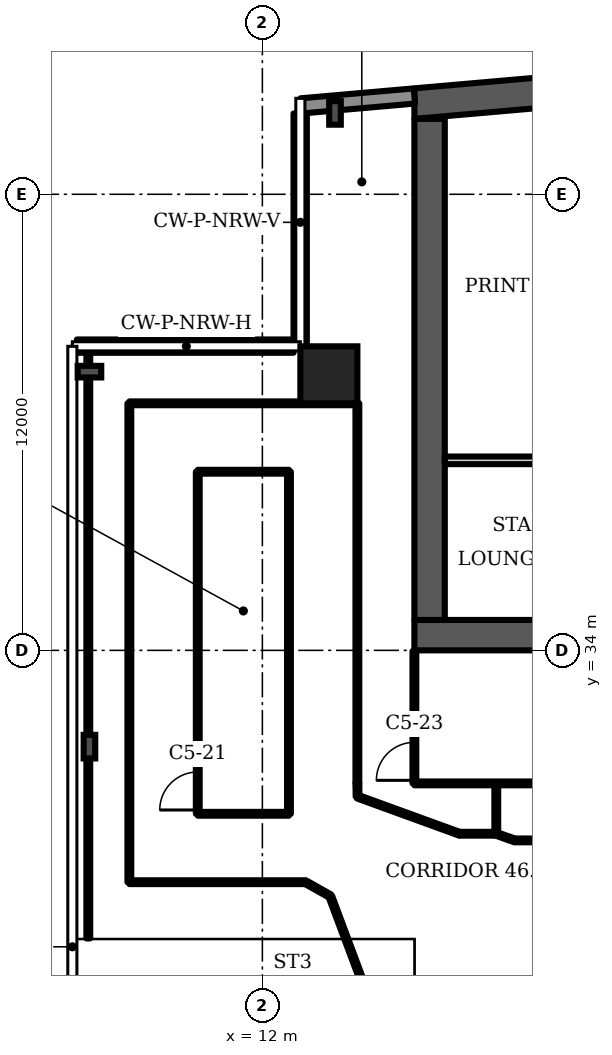
"""IFC4 building model, lengths in metres.
Left out: names, types, materials, properties, quantities, classifications, styles, units other than length and angle.
Written with IfcOpenShell. Run it as: python <this file> out.ifc"""

import sys

from ifc_helpers import new_model, si_unit, direction, frame, frame_2d, origin, origin_2d, place, context, subcontext, project, spatial, polyline, rectangle, i_section, outline, extrude, element, fill, save


model = new_model("IFC4")
c1 = context("Model", 3, precision=1e-05, world=origin(), true_north=direction((0.0, 1.0)))
c2 = subcontext(c1, "Body", "Model", "MODEL_VIEW")
j1 = project(units=[si_unit("LENGTHUNIT", "METRE"), si_unit("PLANEANGLEUNIT", "RADIAN")], contexts=[c1])
p1 = place(None, origin())
s1 = spatial("IfcSite", under=j1, at=p1, CompositionType="ELEMENT")
p2 = place(p1, origin())
s2 = spatial("IfcBuilding", under=s1, at=p2, CompositionType="ELEMENT")
p3 = place(p2, frame((0.0, 0.0, 187.9)))
s3 = spatial("IfcBuildingStorey", under=s2, at=p3, CompositionType="ELEMENT", Elevation=187.9)
p4 = place(p3, origin())
e1 = element("IfcWall", 1, at=p4, inside=s3, PredefinedType="SHEAR", context=c2, shape_type="SweptSolid", body=[
    extrude(outline(polyline([(16.0, 47.984), (37.0, 49.822), (58.0, 47.984), (58.0, 48.787), (37.0, 50.625), (16.0, 48.787), (16.0, 47.984)])), origin(), (0.0, 0.0, 1.0), 3.6),
])
p5 = place(p3, frame((16.0, 34.4, 0.0), z_axis=(0.0, 0.0, 1.0), x_axis=(1.0, 0.0, 0.0)))
e2 = element("IfcWall", 2, at=p5, inside=s3, PredefinedType="SHEAR", context=c2, shape_type="SweptSolid", body=[
    extrude(rectangle(XDim=42.0, YDim=0.8, at=frame_2d((21.0, 0.0))), origin(), (0.0, 0.0, 1.0), 3.6),
])
p6 = place(p5, frame((3.2, 0.0, 0.0)))
e3 = element("IfcOpeningElement", 3, at=p6, cuts=e2, PredefinedType="OPENING", context=c2, shape_type="SweptSolid", body=[
    extrude(rectangle(XDim=1.0, YDim=2.1, at=frame_2d((0.5, 1.05))), frame((0.0, 0.41, 0.0), z_axis=(0.0, -1.0, 0.0), x_axis=(1.0, 0.0, 0.0)), (0.0, 0.0, 1.0), 0.82),
])
p7 = place(p5, frame((7.65, 0.0, 0.0)))
e4 = element("IfcOpeningElement", 4, at=p7, cuts=e2, PredefinedType="OPENING", context=c2, shape_type="SweptSolid", body=[
    extrude(rectangle(XDim=1.2, YDim=2.1, at=frame_2d((0.6, 1.05))), frame((0.0, 0.41, 0.0), z_axis=(0.0, -1.0, 0.0), x_axis=(1.0, 0.0, 0.0)), (0.0, 0.0, 1.0), 0.82),
])
p8 = place(p5, frame((14.767, 0.0, 0.0)))
e5 = element("IfcOpeningElement", 5, at=p8, cuts=e2, PredefinedType="OPENING", context=c2, shape_type="SweptSolid", body=[
    extrude(rectangle(XDim=1.1, YDim=2.1, at=frame_2d((0.55, 1.05))), frame((0.0, 0.41, 0.0), z_axis=(0.0, -1.0, 0.0), x_axis=(1.0, 0.0, 0.0)), (0.0, 0.0, 1.0), 0.82),
])
p9 = place(p5, frame((19.133, 0.0, 0.0)))
e6 = element("IfcOpeningElement", 6, at=p9, cuts=e2, PredefinedType="OPENING", context=c2, shape_type="SweptSolid", body=[
    extrude(rectangle(XDim=1.1, YDim=2.1, at=frame_2d((0.55, 1.05))), frame((0.0, 0.41, 0.0), z_axis=(0.0, -1.0, 0.0), x_axis=(1.0, 0.0, 0.0)), (0.0, 0.0, 1.0), 0.82),
])
p10 = place(p5, frame((16.8, 0.0, 0.0)))
e7 = element("IfcOpeningElement", 7, at=p10, cuts=e2, PredefinedType="OPENING", context=c2, shape_type="SweptSolid", body=[
    extrude(rectangle(XDim=1.4, YDim=2.1, at=frame_2d((0.7, 1.05))), frame((0.0, 0.41, 0.0), z_axis=(0.0, -1.0, 0.0), x_axis=(1.0, 0.0, 0.0)), (0.0, 0.0, 1.0), 0.82),
])
p11 = place(p5, frame((21.767, 0.0, 0.0)))
e8 = element("IfcOpeningElement", 8, at=p11, cuts=e2, PredefinedType="OPENING", context=c2, shape_type="SweptSolid", body=[
    extrude(rectangle(XDim=1.1, YDim=2.1, at=frame_2d((0.55, 1.05))), frame((0.0, 0.41, 0.0), z_axis=(0.0, -1.0, 0.0), x_axis=(1.0, 0.0, 0.0)), (0.0, 0.0, 1.0), 0.82),
])
p12 = place(p5, frame((23.95, 0.0, 0.0)))
e9 = element("IfcOpeningElement", 9, at=p12, cuts=e2, PredefinedType="OPENING", context=c2, shape_type="SweptSolid", body=[
    extrude(rectangle(XDim=1.1, YDim=2.1, at=frame_2d((0.55, 1.05))), frame((0.0, 0.41, 0.0), z_axis=(0.0, -1.0, 0.0), x_axis=(1.0, 0.0, 0.0)), (0.0, 0.0, 1.0), 0.82),
])
p13 = place(p5, frame((26.133, 0.0, 0.0)))
e10 = element("IfcOpeningElement", 10, at=p13, cuts=e2, PredefinedType="OPENING", context=c2, shape_type="SweptSolid", body=[
    extrude(rectangle(XDim=1.1, YDim=2.1, at=frame_2d((0.55, 1.05))), frame((0.0, 0.41, 0.0), z_axis=(0.0, -1.0, 0.0), x_axis=(1.0, 0.0, 0.0)), (0.0, 0.0, 1.0), 0.82),
])
p14 = place(p5, frame((33.15, 0.0, 0.0)))
e11 = element("IfcOpeningElement", 11, at=p14, cuts=e2, PredefinedType="OPENING", context=c2, shape_type="SweptSolid", body=[
    extrude(rectangle(XDim=1.2, YDim=2.1, at=frame_2d((0.6, 1.05))), frame((0.0, 0.41, 0.0), z_axis=(0.0, -1.0, 0.0), x_axis=(1.0, 0.0, 0.0)), (0.0, 0.0, 1.0), 0.82),
])
p15 = place(p5, frame((35.817, 0.0, 0.0)))
e12 = element("IfcOpeningElement", 12, at=p15, cuts=e2, PredefinedType="OPENING", context=c2, shape_type="SweptSolid", body=[
    extrude(rectangle(XDim=1.0, YDim=2.1, at=frame_2d((0.5, 1.05))), frame((0.0, 0.41, 0.0), z_axis=(0.0, -1.0, 0.0), x_axis=(1.0, 0.0, 0.0)), (0.0, 0.0, 1.0), 0.82),
])
p16 = place(p5, frame((39.95, 0.0, 0.0)))
e13 = element("IfcOpeningElement", 13, at=p16, cuts=e2, PredefinedType="OPENING", context=c2, shape_type="SweptSolid", body=[
    extrude(rectangle(XDim=1.0, YDim=2.1, at=frame_2d((0.5, 1.05))), frame((0.0, 0.41, 0.0), z_axis=(0.0, -1.0, 0.0), x_axis=(1.0, 0.0, 0.0)), (0.0, 0.0, 1.0), 0.82),
])
p17 = place(p5, frame((37.767, 0.0, 0.0)))
e14 = element("IfcOpeningElement", 14, at=p17, cuts=e2, PredefinedType="OPENING", context=c2, shape_type="SweptSolid", body=[
    extrude(rectangle(XDim=1.4, YDim=2.1, at=frame_2d((0.7, 1.05))), frame((0.0, 0.41, 0.0), z_axis=(0.0, -1.0, 0.0), x_axis=(1.0, 0.0, 0.0)), (0.0, 0.0, 1.0), 0.82),
])
p18 = place(p3, frame((16.4, 34.8, 0.0), z_axis=(0.0, 0.0, 1.0), x_axis=(0.0, 1.0, 0.0)))
e15 = element("IfcWall", 15, at=p18, inside=s3, PredefinedType="SHEAR", context=c2, shape_type="SweptSolid", body=[
    extrude(rectangle(XDim=13.184, YDim=0.8, at=frame_2d((6.592, 0.0))), origin(), (0.0, 0.0, 1.0), 3.6),
])
p19 = place(p3, frame((13.75, 41.25, 0.0), z_axis=(0.0, 0.0, 1.0), x_axis=(1.0, 0.0, 0.0)))
e16 = element("IfcColumn", 16, at=p19, inside=s3, PredefinedType="COLUMN", context=c2, shape_type="SweptSolid", body=[
    extrude(rectangle(XDim=1.5, YDim=1.5, at=origin_2d()), origin(), (0.0, 0.0, 1.0), 3.6),
])
for number, where, z_axis, x_axis in (
    (17, (13.911, 48.141, 0.0), (0.0, 0.0, 1.0), (-1.0, 0.0, 0.0)),
    (18, (7.45, 41.333, 0.0), (0.0, 0.0, 1.0), (0.0, 1.0, 0.0)),
    (19, (7.45, 31.467, 0.0), (0.0, 0.0, 1.0), (-1.0, 0.0, 0.0)),
):
    element("IfcColumn", number, at=place(p3, frame(where, z_axis=z_axis, x_axis=x_axis)), inside=s3, PredefinedType="COLUMN", context=c2, shape_type="SweptSolid", body=[
        extrude(i_section(OverallWidth=0.305, OverallDepth=0.62, WebThickness=0.021, FlangeThickness=0.04, FilletRadius=0.027, at=origin_2d()), origin(), (0.0, 0.0, 1.0), 3.6),
    ])
p20 = place(p3, frame((16.0, 48.587, 0.0), z_axis=(0.0, 0.0, 1.0), x_axis=(-0.996194, -0.087168, 0.0)))
e20 = element("IfcWall", 20, at=p20, inside=s3, PredefinedType="SOLIDWALL", context=c2, shape_type="SweptSolid", body=[
    extrude(rectangle(XDim=2.994, YDim=0.4, at=frame_2d((1.497, 0.0))), origin(), (0.0, 0.0, 1.0), 3.2),
])
p21 = place(p3, frame((12.995, 48.126, 0.0), z_axis=(0.0, 0.0, 1.0), x_axis=(0.0, -1.0, 0.0)))
e21 = element("IfcWall", 21, at=p21, inside=s3, PredefinedType="SOLIDWALL", context=c2, shape_type="SweptSolid", body=[
    extrude(rectangle(XDim=6.126, YDim=0.35, at=frame_2d((3.063, 0.0))), origin(), (0.0, 0.0, 1.0), 1.0),
])
p22 = place(p3, frame((12.82, 42.005, 0.0), z_axis=(0.0, 0.0, 1.0), x_axis=(-1.0, 0.0, 0.0)))
e22 = element("IfcWall", 22, at=p22, inside=s3, PredefinedType="SOLIDWALL", context=c2, shape_type="SweptSolid", body=[
    extrude(rectangle(XDim=5.7, YDim=0.35, at=frame_2d((2.85, 0.0))), origin(), (0.0, 0.0, 1.0), 1.0),
])
p23 = place(p3, frame((16.8, 39.0, 0.0), z_axis=(0.0, 0.0, 1.0), x_axis=(1.0, 0.0, 0.0)))
e23 = element("IfcWall", 23, at=p23, inside=s3, PredefinedType="PARTITIONING", context=c2, shape_type="SweptSolid", body=[
    extrude(rectangle(XDim=5.8, YDim=0.2, at=frame_2d((2.9, 0.0))), origin(), (0.0, 0.0, 1.0), 3.2),
])
p24 = place(p23, frame((2.4, 0.0, 0.0)))
e24 = element("IfcOpeningElement", 24, at=p24, cuts=e23, PredefinedType="OPENING", context=c2, shape_type="SweptSolid", body=[
    extrude(rectangle(XDim=1.0, YDim=2.1, at=frame_2d((0.5, 1.05))), frame((0.0, 0.11, 0.0), z_axis=(0.0, -1.0, 0.0), x_axis=(1.0, 0.0, 0.0)), (0.0, 0.0, 1.0), 0.22),
])
p25 = place(p3, frame((7.42, 26.42, 0.0), z_axis=(0.0, 0.0, 1.0), x_axis=(0.0, 1.0, 0.0)))
e25 = element("IfcWall", 25, at=p25, inside=s3, PredefinedType="PARTITIONING", context=c2, shape_type="SweptSolid", body=[
    extrude(rectangle(XDim=15.56, YDim=0.1, at=frame_2d((7.78, 0.0))), origin(), (0.0, 0.0, 1.0), 2.58),
])
p26 = place(p3, frame((8.5, 27.9, 0.0), z_axis=(0.0, 0.0, 1.0), x_axis=(0.0, 1.0, 0.0)))
e26 = element("IfcWall", 26, at=p26, inside=s3, PredefinedType="PARTITIONING", context=c2, shape_type="SweptSolid", body=[
    extrude(rectangle(XDim=12.6, YDim=0.1, at=frame_2d((6.3, 0.0))), origin(), (0.0, 0.0, 1.0), 3.2),
])
p27 = place(p3, frame((8.5, 27.9, 0.0), z_axis=(0.0, 0.0, 1.0), x_axis=(1.0, 0.0, 0.0)))
e27 = element("IfcWall", 27, at=p27, inside=s3, PredefinedType="PARTITIONING", context=c2, shape_type="SweptSolid", body=[
    extrude(rectangle(XDim=4.635, YDim=0.1, at=frame_2d((2.317, 0.0))), origin(), (0.0, 0.0, 1.0), 3.2),
])
p28 = place(p3, frame((8.5, 40.5, 0.0), z_axis=(0.0, 0.0, 1.0), x_axis=(1.0, 0.0, 0.0)))
e28 = element("IfcWall", 28, at=p28, inside=s3, PredefinedType="PARTITIONING", context=c2, shape_type="SweptSolid", body=[
    extrude(rectangle(XDim=6.0, YDim=0.1, at=frame_2d((3.0, 0.0))), origin(), (0.0, 0.0, 1.0), 3.2),
])
p29 = place(p3, frame((10.3, 29.7, 0.0), z_axis=(0.0, 0.0, 1.0), x_axis=(0.0, 1.0, 0.0)))
e29 = element("IfcWall", 29, at=p29, inside=s3, PredefinedType="PARTITIONING", context=c2, shape_type="SweptSolid", body=[
    extrude(rectangle(XDim=9.0, YDim=0.1, at=frame_2d((4.5, 0.0))), origin(), (0.0, 0.0, 1.0), 3.2),
])
p30 = place(p29, frame((0.1, 0.0, 0.0)))
e30 = element("IfcOpeningElement", 30, at=p30, cuts=e29, PredefinedType="OPENING", context=c2, shape_type="SweptSolid", body=[
    extrude(rectangle(XDim=1.0, YDim=2.1, at=frame_2d((0.5, 1.05))), frame((0.0, 0.06, 0.0), z_axis=(0.0, -1.0, 0.0), x_axis=(1.0, 0.0, 0.0)), (0.0, 0.0, 1.0), 0.12),
])
for number, where, z_axis, x_axis in (
    (31, (10.3, 29.7, 0.0), (0.0, 0.0, 1.0), (1.0, 0.0, 0.0)),
    (32, (10.3, 38.7, 0.0), (0.0, 0.0, 1.0), (1.0, 0.0, 0.0)),
):
    element("IfcWall", number, at=place(p3, frame(where, z_axis=z_axis, x_axis=x_axis)), inside=s3, PredefinedType="PARTITIONING", context=c2, shape_type="SweptSolid", body=[
        extrude(rectangle(XDim=2.4, YDim=0.1, at=frame_2d((1.2, 0.0))), origin(), (0.0, 0.0, 1.0), 3.2),
    ])
p31 = place(p3, frame((12.7, 29.7, 0.0), z_axis=(0.0, 0.0, 1.0), x_axis=(0.0, 1.0, 0.0)))
e33 = element("IfcWall", 33, at=p31, inside=s3, PredefinedType="PARTITIONING", context=c2, shape_type="SweptSolid", body=[
    extrude(rectangle(XDim=9.0, YDim=0.1, at=frame_2d((4.5, 0.0))), origin(), (0.0, 0.0, 1.0), 3.2),
])
p32 = place(p3, frame((13.785, 27.535, 0.0), z_axis=(0.0, 0.0, 1.0), x_axis=(-0.871911, 0.489672, 0.0)))
e34 = element("IfcWall", 34, at=p32, inside=s3, PredefinedType="PARTITIONING", context=c2, shape_type="SweptSolid", body=[
    extrude(rectangle(XDim=0.745, YDim=0.1, at=frame_2d((0.373, 0.0))), origin(), (0.0, 0.0, 1.0), 3.2),
])
p33 = place(p3, frame((14.5, 30.5, 0.0), z_axis=(0.0, 0.0, 1.0), x_axis=(0.0, 1.0, 0.0)))
e35 = element("IfcWall", 35, at=p33, inside=s3, PredefinedType="PARTITIONING", context=c2, shape_type="SweptSolid", body=[
    extrude(rectangle(XDim=10.0, YDim=0.1, at=frame_2d((5.0, 0.0))), origin(), (0.0, 0.0, 1.0), 3.2),
])
p34 = place(p3, frame((14.505, 30.15, 0.0), z_axis=(0.0, 0.0, 1.0), x_axis=(-0.013946, 0.999907, 0.0)))
e36 = element("IfcWall", 36, at=p34, inside=s3, PredefinedType="PARTITIONING", context=c2, shape_type="SweptSolid", body=[
    extrude(rectangle(XDim=0.35, YDim=0.1, at=frame_2d((0.175, 0.0))), origin(), (0.0, 0.0, 1.0), 3.2),
])
p35 = place(p3, frame((14.706, 25.075, 0.0), z_axis=(0.0, 0.0, 1.0), x_axis=(-0.350591, 0.936528, 0.0)))
e37 = element("IfcWall", 37, at=p35, inside=s3, PredefinedType="PARTITIONING", context=c2, shape_type="SweptSolid", body=[
    extrude(rectangle(XDim=2.614, YDim=0.1, at=frame_2d((1.307, 0.0))), origin(), (0.0, 0.0, 1.0), 3.2),
])
p36 = place(p3, frame((16.0, 30.5, 0.0), z_axis=(0.0, 0.0, 1.0), x_axis=(0.0, 1.0, 0.0)))
e38 = element("IfcWall", 38, at=p36, inside=s3, PredefinedType="PARTITIONING", context=c2, shape_type="SweptSolid", body=[
    extrude(rectangle(XDim=3.48, YDim=0.1, at=frame_2d((1.74, 0.0))), origin(), (0.0, 0.0, 1.0), 3.2),
])
p37 = place(p36, frame((0.08, 0.0, 0.0)))
e39 = element("IfcOpeningElement", 39, at=p37, cuts=e38, PredefinedType="OPENING", context=c2, shape_type="SweptSolid", body=[
    extrude(rectangle(XDim=1.0, YDim=2.1, at=frame_2d((0.5, 1.05))), frame((0.0, 0.06, 0.0), z_axis=(0.0, -1.0, 0.0), x_axis=(1.0, 0.0, 0.0)), (0.0, 0.0, 1.0), 0.12),
])
p38 = place(p3, frame((16.0, 30.5, 0.0), z_axis=(0.0, 0.0, 1.0), x_axis=(1.0, 0.0, 0.0)))
e40 = element("IfcWall", 40, at=p38, inside=s3, PredefinedType="PARTITIONING", context=c2, shape_type="SweptSolid", body=[
    extrude(rectangle(XDim=20.85, YDim=0.1, at=frame_2d((10.425, 0.0))), origin(), (0.0, 0.0, 1.0), 3.2),
])
p39 = place(p3, frame((17.185, 29.175, 0.0), z_axis=(0.0, 0.0, 1.0), x_axis=(1.0, 0.0, 0.0)))
e41 = element("IfcWall", 41, at=p39, inside=s3, PredefinedType="PARTITIONING", context=c2, shape_type="SweptSolid", body=[
    extrude(rectangle(XDim=0.97, YDim=0.1, at=frame_2d((0.485, 0.0))), origin(), (0.0, 0.0, 1.0), 3.2),
])
p40 = place(p3, frame((17.185, 29.175, 0.0), z_axis=(0.0, 0.0, 1.0), x_axis=(-0.939764, 0.341818, 0.0)))
e42 = element("IfcWall", 42, at=p40, inside=s3, PredefinedType="PARTITIONING", context=c2, shape_type="SweptSolid", body=[
    extrude(rectangle(XDim=2.852, YDim=0.1, at=frame_2d((1.426, 0.0))), origin(), (0.0, 0.0, 1.0), 3.2),
])
p41 = place(p3, frame((18.155, 29.18, 0.0), z_axis=(0.0, 0.0, 1.0), x_axis=(0.0, 1.0, 0.0)))
e43 = element("IfcWall", 43, at=p41, inside=s3, PredefinedType="PARTITIONING", context=c2, shape_type="SweptSolid", body=[
    extrude(rectangle(XDim=1.32, YDim=0.1, at=frame_2d((0.66, 0.0))), origin(), (0.0, 0.0, 1.0), 3.2),
])
p42 = place(p3, frame((18.49, 29.05, 0.0), z_axis=(0.0, 0.0, 1.0), x_axis=(-0.939932, 0.341351, 0.0)))
e44 = element("IfcWall", 44, at=p42, inside=s3, PredefinedType="PARTITIONING", context=c2, shape_type="SweptSolid", body=[
    extrude(rectangle(XDim=0.351, YDim=0.1, at=frame_2d((0.176, 0.0))), origin(), (0.0, 0.0, 1.0), 3.2),
])
p43 = place(p3, frame((18.635, 29.0, 0.0), z_axis=(0.0, 0.0, 1.0), x_axis=(-0.937648, 0.347591, 0.0)))
e45 = element("IfcWall", 45, at=p43, inside=s3, PredefinedType="PARTITIONING", context=c2, shape_type="SweptSolid", body=[
    extrude(rectangle(XDim=0.144, YDim=0.1, at=frame_2d((0.072, 0.0))), origin(), (0.0, 0.0, 1.0), 3.2),
])
p44 = place(p3, frame((18.635, 29.0, 0.0), z_axis=(0.0, 0.0, 1.0), x_axis=(1.0, 0.0, 0.0)))
e46 = element("IfcWall", 46, at=p44, inside=s3, PredefinedType="PARTITIONING", context=c2, shape_type="SweptSolid", body=[
    extrude(rectangle(XDim=40.865, YDim=0.1, at=frame_2d((20.433, 0.0))), origin(), (0.0, 0.0, 1.0), 3.2),
])
p45 = place(p44, frame((30.545, 0.0, 0.0)))
e47 = element("IfcOpeningElement", 47, at=p45, cuts=e46, PredefinedType="OPENING", context=c2, shape_type="SweptSolid", body=[
    extrude(rectangle(XDim=1.0, YDim=2.1, at=frame_2d((0.5, 1.05))), frame((0.0, 0.06, 0.0), z_axis=(0.0, -1.0, 0.0), x_axis=(1.0, 0.0, 0.0)), (0.0, 0.0, 1.0), 0.12),
])
p46 = place(p30, origin())
e48 = element("IfcDoor", 48, at=p46, inside=s3, OperationType="SINGLE_SWING_LEFT", PredefinedType="DOOR", context=c2, shape_type="SweptSolid", body=[
    extrude(rectangle(XDim=1.0, YDim=2.1, at=frame_2d((0.5, 1.05))), frame((0.0, 0.025, 0.0), z_axis=(0.0, -1.0, 0.0), x_axis=(1.0, 0.0, 0.0)), (0.0, 0.0, 1.0), 0.05),
])
fill(e30, e48)
p47 = place(p37, origin())
e49 = element("IfcDoor", 49, at=p47, inside=s3, OperationType="SINGLE_SWING_LEFT", PredefinedType="DOOR", context=c2, shape_type="SweptSolid", body=[
    extrude(rectangle(XDim=1.0, YDim=2.1, at=frame_2d((0.5, 1.05))), frame((0.0, 0.025, 0.0), z_axis=(0.0, -1.0, 0.0), x_axis=(1.0, 0.0, 0.0)), (0.0, 0.0, 1.0), 0.05),
])
fill(e39, e49)
save(model, sys.argv[1])
